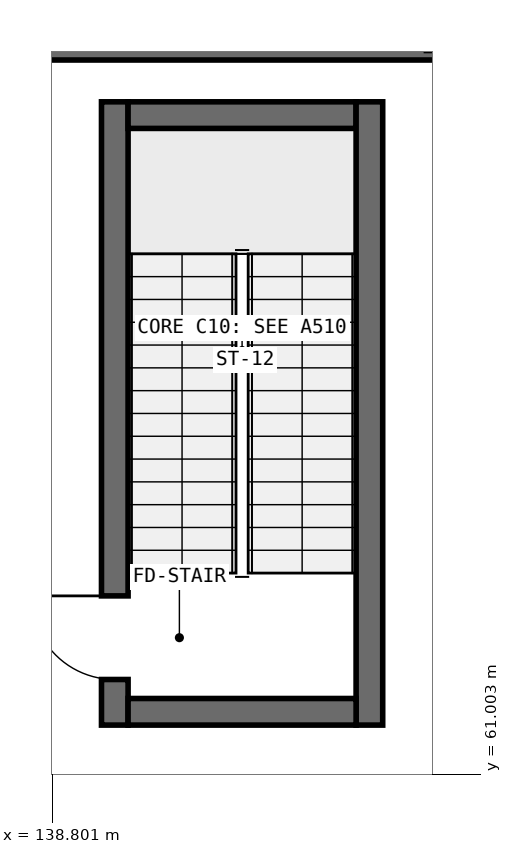
"""IFC4 building model, lengths in metres.
Left out: names, types, materials, properties, quantities, classifications, styles, units other than length and angle.
Written with IfcOpenShell. Run it as: python <this file> out.ifc"""

import sys

from ifc_helpers import new_model, si_unit, direction, frame, frame_2d, origin, place, context, subcontext, project, spatial, rectangle, extrude, element, fill, save


model = new_model("IFC4")
c1 = context("Model", 3, precision=1e-05, world=origin(), true_north=direction((0.0, 1.0)))
c2 = subcontext(c1, "Body", "Model", "MODEL_VIEW")
j1 = project(units=[si_unit("LENGTHUNIT", "METRE"), si_unit("PLANEANGLEUNIT", "RADIAN")], contexts=[c1])
p1 = place(None, origin())
s1 = spatial("IfcSite", under=j1, at=p1, CompositionType="ELEMENT")
p2 = place(p1, origin())
s2 = spatial("IfcBuilding", under=s1, at=p2, CompositionType="ELEMENT")
p3 = place(p2, frame((0.0, 0.0, -5.25)))
s3 = spatial("IfcBuildingStorey", under=s2, at=p3, CompositionType="ELEMENT", Elevation=-5.25)
p4 = place(p3, frame((139.625, 61.65, 0.0), z_axis=(0.0, 0.0, 1.0), x_axis=(0.0, 1.0, 0.0)))
e1 = element("IfcWall", 1, at=p4, inside=s3, PredefinedType="SHEAR", context=c2, shape_type="SweptSolid", body=[
    extrude(rectangle(XDim=8.2, YDim=0.35, at=frame_2d((4.1, 0.0))), origin(), (0.0, 0.0, 1.0), 5.25),
])
p5 = place(p4, frame((0.6, 0.0, 0.0)))
e2 = element("IfcOpeningElement", 2, at=p5, cuts=e1, PredefinedType="OPENING", context=c2, shape_type="SweptSolid", body=[
    extrude(rectangle(XDim=1.1, YDim=2.15, at=frame_2d((0.55, 1.075))), frame((0.0, 0.185, 0.0), z_axis=(0.0, -1.0, 0.0), x_axis=(1.0, 0.0, 0.0)), (0.0, 0.0, 1.0), 0.37),
])
p6 = place(p3, frame((139.8, 69.675, 0.0), z_axis=(0.0, 0.0, 1.0), x_axis=(1.0, 0.0, 0.0)))
e3 = element("IfcWall", 3, at=p6, inside=s3, PredefinedType="SHEAR", context=c2, shape_type="SweptSolid", body=[
    extrude(rectangle(XDim=3.0, YDim=0.35, at=frame_2d((1.5, 0.0))), origin(), (0.0, 0.0, 1.0), 5.25),
])
p7 = place(p3, frame((142.975, 69.85, 0.0), z_axis=(0.0, 0.0, 1.0), x_axis=(0.0, -1.0, 0.0)))
e4 = element("IfcWall", 4, at=p7, inside=s3, PredefinedType="SHEAR", context=c2, shape_type="SweptSolid", body=[
    extrude(rectangle(XDim=8.2, YDim=0.35, at=frame_2d((4.1, 0.0))), origin(), (0.0, 0.0, 1.0), 5.25),
])
p8 = place(p3, frame((142.8, 61.825, 0.0), z_axis=(0.0, 0.0, 1.0), x_axis=(-1.0, 0.0, 0.0)))
e5 = element("IfcWall", 5, at=p8, inside=s3, PredefinedType="SHEAR", context=c2, shape_type="SweptSolid", body=[
    extrude(rectangle(XDim=3.0, YDim=0.35, at=frame_2d((1.5, 0.0))), origin(), (0.0, 0.0, 1.0), 5.25),
])
p9 = place(p3, frame((126.4, 70.6, 0.0), z_axis=(0.0, 0.0, 1.0), x_axis=(1.0, 0.0, 0.0)))
e6 = element("IfcWall", 6, at=p9, inside=s3, PredefinedType="USERDEFINED", context=c2, shape_type="SweptSolid", body=[
    extrude(rectangle(XDim=47.2, YDim=0.4, at=frame_2d((23.6, 0.0))), origin(), (0.0, 0.0, 1.0), 5.25),
])
p10 = place(p5, origin())
e7 = element("IfcDoor", 7, at=p10, inside=s3, OperationType="SINGLE_SWING_RIGHT", PredefinedType="DOOR", context=c2, shape_type="SweptSolid", body=[
    extrude(rectangle(XDim=1.1, YDim=2.15, at=frame_2d((0.55, 1.075))), frame((0.0, 0.025, 0.0), z_axis=(0.0, -1.0, 0.0), x_axis=(1.0, 0.0, 0.0)), (0.0, 0.0, 1.0), 0.05),
])
fill(e2, e7)
save(model, sys.argv[1])
